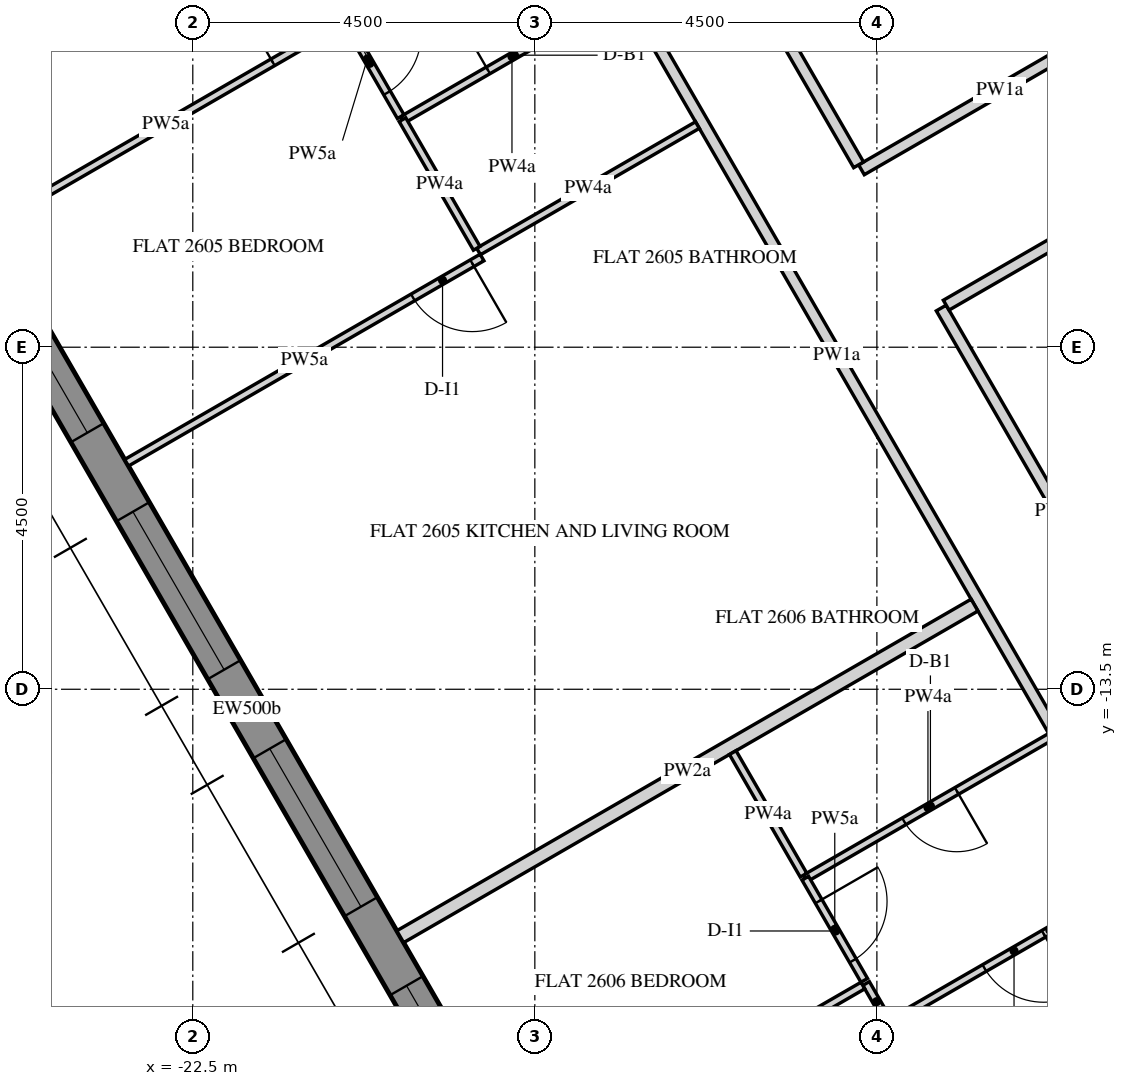
"""IFC4 building model, lengths in metres.
Left out: names, types, materials, properties, quantities, classifications, styles, units other than length and angle.
Written with IfcOpenShell. Run it as: python <this file> out.ifc"""

import sys

from ifc_helpers import new_model, si_unit, direction, frame, frame_2d, origin, place, context, subcontext, project, spatial, polyline, rectangle, outline, extrude, element, fill, save


model = new_model("IFC4")
c1 = context("Model", 3, precision=1e-05, world=origin(), true_north=direction((0.0, 1.0)))
c2 = subcontext(c1, "Body", "Model", "MODEL_VIEW")
j1 = project(units=[si_unit("LENGTHUNIT", "METRE"), si_unit("PLANEANGLEUNIT", "RADIAN")], contexts=[c1])
p1 = place(None, origin())
s1 = spatial("IfcSite", under=j1, at=p1, CompositionType="ELEMENT")
p2 = place(p1, origin())
s2 = spatial("IfcBuilding", under=s1, at=p2, CompositionType="ELEMENT")
p3 = place(p2, frame((0.0, 0.0, 334.2)))
s3 = spatial("IfcBuildingStorey", under=s2, at=p3, CompositionType="ELEMENT", Elevation=334.2)
p4 = place(p3, frame((-28.149, -2.745, -0.15), z_axis=(0.0, 0.0, 1.0), x_axis=(0.500003737743, -0.866023245787, 0.0)))
e1 = element("IfcWall", 1, at=p4, inside=s3, PredefinedType="SOLIDWALL", context=c2, shape_type="SweptSolid", body=[
    extrude(outline(polyline([(-0.021, -0.25), (25.468, -0.25), (25.421, 0.25), (0.021, 0.25), (-0.021, -0.25)])), origin(), (0.0, 0.0, 1.0), 3.75),
])
p5 = place(p4, frame((2.522, 0.0, 0.75)))
e2 = element("IfcOpeningElement", 2, at=p5, cuts=e1, PredefinedType="OPENING", context=c2, shape_type="SweptSolid", body=[
    extrude(rectangle(XDim=2.4, YDim=2.7, at=frame_2d((1.2, 1.35))), frame((0.0, 0.26, 0.0), z_axis=(0.0, -1.0, 0.0), x_axis=(1.0, 0.0, 0.0)), (0.0, 0.0, 1.0), 0.52),
])
p6 = place(p4, frame((6.122, 0.0, 0.75)))
e3 = element("IfcOpeningElement", 3, at=p6, cuts=e1, PredefinedType="OPENING", context=c2, shape_type="SweptSolid", body=[
    extrude(rectangle(XDim=2.4, YDim=2.7, at=frame_2d((1.2, 1.35))), frame((0.0, 0.26, 0.0), z_axis=(0.0, -1.0, 0.0), x_axis=(1.0, 0.0, 0.0)), (0.0, 0.0, 1.0), 0.52),
])
p7 = place(p4, frame((9.722, 0.0, 0.75)))
e4 = element("IfcOpeningElement", 4, at=p7, cuts=e1, PredefinedType="OPENING", context=c2, shape_type="SweptSolid", body=[
    extrude(rectangle(XDim=2.4, YDim=2.7, at=frame_2d((1.2, 1.35))), frame((0.0, 0.26, 0.0), z_axis=(0.0, -1.0, 0.0), x_axis=(1.0, 0.0, 0.0)), (0.0, 0.0, 1.0), 0.52),
])
p8 = place(p4, frame((13.323, 0.0, 0.75)))
e5 = element("IfcOpeningElement", 5, at=p8, cuts=e1, PredefinedType="OPENING", context=c2, shape_type="SweptSolid", body=[
    extrude(rectangle(XDim=2.4, YDim=2.7, at=frame_2d((1.2, 1.35))), frame((0.0, 0.26, 0.0), z_axis=(0.0, -1.0, 0.0), x_axis=(1.0, 0.0, 0.0)), (0.0, 0.0, 1.0), 0.52),
])
p9 = place(p4, frame((16.922, 0.0, 0.75)))
e6 = element("IfcOpeningElement", 6, at=p9, cuts=e1, PredefinedType="OPENING", context=c2, shape_type="SweptSolid", body=[
    extrude(rectangle(XDim=2.4, YDim=2.7, at=frame_2d((1.2, 1.35))), frame((0.0, 0.26, 0.0), z_axis=(0.0, -1.0, 0.0), x_axis=(1.0, 0.0, 0.0)), (0.0, 0.0, 1.0), 0.52),
])
p10 = place(p4, frame((20.522, 0.0, 0.75)))
e7 = element("IfcOpeningElement", 7, at=p10, cuts=e1, PredefinedType="OPENING", context=c2, shape_type="SweptSolid", body=[
    extrude(rectangle(XDim=2.4, YDim=2.7, at=frame_2d((1.2, 1.35))), frame((0.0, 0.26, 0.0), z_axis=(0.0, -1.0, 0.0), x_axis=(1.0, 0.0, 0.0)), (0.0, 0.0, 1.0), 0.52),
])
p11 = place(p3, frame((-12.471, 0.0, -0.15), z_axis=(0.0, 0.0, 1.0), x_axis=(0.499996419489, -0.866027470984, 0.0)))
e8 = element("IfcWall", 8, at=p11, inside=s3, PredefinedType="SHEAR", context=c2, shape_type="SweptSolid", body=[
    extrude(outline(polyline([(-0.115, -0.2), (12.586, -0.2), (12.355, 0.2), (0.115, 0.2), (-0.115, -0.2)])), origin(), (0.0, 0.0, 1.0), 3.75),
])
p12 = place(p11, frame((5.306, 0.0, 0.15)))
e9 = element("IfcOpeningElement", 9, at=p12, cuts=e8, PredefinedType="OPENING", context=c2, shape_type="SweptSolid", body=[
    extrude(rectangle(XDim=1.8, YDim=2.4, at=frame_2d((0.9, 1.2))), frame((0.0, 0.21, 0.0), z_axis=(0.0, -1.0, 0.0), x_axis=(1.0, 0.0, 0.0)), (0.0, 0.0, 1.0), 0.42),
])
p13 = place(p3, frame((-17.696, -2.749, 0.0), z_axis=(0.0, 0.0, 1.0), x_axis=(0.499997948852, -0.866026588012, 0.0)))
e10 = element("IfcWall", 10, at=p13, inside=s3, PredefinedType="PARTITIONING", context=c2, shape_type="SweptSolid", body=[
    extrude(rectangle(XDim=14.677, YDim=0.15, at=frame_2d((7.339, 0.0))), origin(), (0.0, 0.0, 1.0), 2.838),
])
p14 = place(p13, frame((0.4, 0.0, 0.0)))
e11 = element("IfcOpeningElement", 11, at=p14, cuts=e10, PredefinedType="OPENING", context=c2, shape_type="SweptSolid", body=[
    extrude(rectangle(XDim=1.0, YDim=2.1, at=frame_2d((0.5, 1.05))), frame((0.0, 0.085, 0.0), z_axis=(0.0, -1.0, 0.0), x_axis=(1.0, 0.0, 0.0)), (0.0, 0.0, 1.0), 0.17),
])
p15 = place(p13, frame((13.527, 0.0, 0.0)))
e12 = element("IfcOpeningElement", 12, at=p15, cuts=e10, PredefinedType="OPENING", context=c2, shape_type="SweptSolid", body=[
    extrude(rectangle(XDim=1.0, YDim=2.1, at=frame_2d((0.5, 1.05))), frame((0.0, 0.085, 0.0), z_axis=(0.0, -1.0, 0.0), x_axis=(1.0, 0.0, 0.0)), (0.0, 0.0, 1.0), 0.17),
])
p16 = place(p3, frame((-10.066, -4.566, 0.0), z_axis=(0.0, 0.0, 1.0), x_axis=(-0.866023935413, -0.500002543286, 0.0)))
e13 = element("IfcWall", 13, at=p16, inside=s3, PredefinedType="PARTITIONING", context=c2, shape_type="SweptSolid", body=[
    extrude(rectangle(XDim=4.2, YDim=0.15, at=frame_2d((2.1, 0.0))), origin(), (0.0, 0.0, 1.0), 2.838),
])
p17 = place(p3, frame((-13.74, -6.601, 0.0), z_axis=(0.0, 0.0, 1.0), x_axis=(-0.499976727135, 0.866038839962, 0.0)))
e14 = element("IfcWall", 14, at=p17, inside=s3, PredefinedType="PARTITIONING", context=c2, shape_type="SweptSolid", body=[
    extrude(rectangle(XDim=4.516, YDim=0.15, at=frame_2d((2.258, 0.0))), origin(), (0.0, 0.0, 1.0), 2.838),
])
p18 = place(p3, frame((-9.569, -13.826, 0.0), z_axis=(0.0, 0.0, 1.0), x_axis=(-0.500017101833, 0.866015529811, 0.0)))
e15 = element("IfcWall", 15, at=p18, inside=s3, PredefinedType="PARTITIONING", context=c2, shape_type="SweptSolid", body=[
    extrude(rectangle(XDim=6.168, YDim=0.15, at=frame_2d((3.084, 0.0))), origin(), (0.0, 0.0, 1.0), 2.838),
])
p19 = place(p3, frame((-12.588, -8.447, 0.0), z_axis=(0.0, 0.0, 1.0), x_axis=(0.866034795751, 0.499983732284, 0.0)))
e16 = element("IfcWall", 16, at=p19, inside=s3, PredefinedType="PARTITIONING", context=c2, shape_type="SweptSolid", body=[
    extrude(rectangle(XDim=4.125, YDim=0.15, at=frame_2d((2.062, 0.0))), origin(), (0.0, 0.0, 1.0), 2.838),
])
p20 = place(p3, frame((-15.861, -6.078, 0.0), z_axis=(0.0, 0.0, 1.0), x_axis=(-0.866020521143, -0.500008456887, 0.0)))
e17 = element("IfcWall", 17, at=p20, inside=s3, PredefinedType="PARTITIONING", context=c2, shape_type="SweptSolid", body=[
    extrude(rectangle(XDim=3.325, YDim=0.1, at=frame_2d((1.663, 0.0))), origin(), (0.0, 0.0, 1.0), 2.838),
])
p21 = place(p3, frame((-18.695, -7.82, 0.0), z_axis=(0.0, 0.0, 1.0), x_axis=(-0.866028230842, -0.499995103361, 0.0)))
e18 = element("IfcWall", 18, at=p21, inside=s3, PredefinedType="PARTITIONING", context=c2, shape_type="SweptSolid", body=[
    extrude(rectangle(XDim=5.4, YDim=0.1, at=frame_2d((2.7, 0.0))), origin(), (0.0, 0.0, 1.0), 2.838),
])
p22 = place(p21, frame((0.15, 0.0, 0.0)))
e19 = element("IfcOpeningElement", 19, at=p22, cuts=e18, PredefinedType="OPENING", context=c2, shape_type="SweptSolid", body=[
    extrude(rectangle(XDim=0.9, YDim=2.1, at=frame_2d((0.45, 1.05))), frame((0.0, 0.06, 0.0), z_axis=(0.0, -1.0, 0.0), x_axis=(1.0, 0.0, 0.0)), (0.0, 0.0, 1.0), 0.12),
])
p23 = place(p3, frame((-19.771, -16.755, 0.0), z_axis=(0.0, 0.0, 1.0), x_axis=(0.866025292695, 0.500000192413, 0.0)))
e20 = element("IfcWall", 20, at=p23, inside=s3, PredefinedType="PARTITIONING", context=c2, shape_type="SweptSolid", body=[
    extrude(rectangle(XDim=8.725, YDim=0.18, at=frame_2d((4.363, 0.0))), origin(), (0.0, 0.0, 1.0), 2.838),
])
p24 = place(p3, frame((-19.741, -6.008, 0.0), z_axis=(0.0, 0.0, 1.0), x_axis=(0.866052313871, 0.499953387465, 0.0)))
e21 = element("IfcWall", 21, at=p24, inside=s3, PredefinedType="PARTITIONING", context=c2, shape_type="SweptSolid", body=[
    extrude(rectangle(XDim=3.325, YDim=0.1, at=frame_2d((1.663, 0.0))), origin(), (0.0, 0.0, 1.0), 2.838),
])
p25 = place(p24, frame((1.3, 0.0, 0.0)))
e22 = element("IfcOpeningElement", 22, at=p25, cuts=e21, PredefinedType="OPENING", context=c2, shape_type="SweptSolid", body=[
    extrude(rectangle(XDim=0.8, YDim=2.1, at=frame_2d((0.4, 1.05))), frame((0.0, 0.06, 0.0), z_axis=(0.0, -1.0, 0.0), x_axis=(1.0, 0.0, 0.0)), (0.0, 0.0, 1.0), 0.12),
])
p26 = place(p3, frame((-20.642, -4.448, 0.0), z_axis=(0.0, 0.0, 1.0), x_axis=(0.499971461383, -0.866041879935, 0.0)))
e23 = element("IfcWall", 23, at=p26, inside=s3, PredefinedType="PARTITIONING", context=c2, shape_type="SweptSolid", body=[
    extrude(rectangle(XDim=1.754, YDim=0.1, at=frame_2d((0.877, 0.0))), origin(), (0.0, 0.0, 1.0), 2.838),
])
p27 = place(p26, frame((0.494, 0.0, 0.0)))
e24 = element("IfcOpeningElement", 24, at=p27, cuts=e23, PredefinedType="OPENING", context=c2, shape_type="SweptSolid", body=[
    extrude(rectangle(XDim=0.9, YDim=2.1, at=frame_2d((0.45, 1.05))), frame((0.0, 0.06, 0.0), z_axis=(0.0, -1.0, 0.0), x_axis=(1.0, 0.0, 0.0)), (0.0, 0.0, 1.0), 0.12),
])
p28 = place(p3, frame((-19.742, -6.006, 0.0), z_axis=(0.0, 0.0, 1.0), x_axis=(0.499982003349, -0.866035793907, 0.0)))
e25 = element("IfcWall", 25, at=p28, inside=s3, PredefinedType="PARTITIONING", context=c2, shape_type="SweptSolid", body=[
    extrude(rectangle(XDim=1.954, YDim=0.1, at=frame_2d((0.977, 0.0))), origin(), (0.0, 0.0, 1.0), 2.838),
])
p29 = place(p3, frame((-25.171, -7.402, 0.0), z_axis=(0.0, 0.0, 1.0), x_axis=(0.866013074135, 0.500021354972, 0.0)))
e26 = element("IfcWall", 26, at=p29, inside=s3, PredefinedType="PARTITIONING", context=c2, shape_type="SweptSolid", body=[
    extrude(rectangle(XDim=5.35, YDim=0.1, at=frame_2d((2.675, 0.0))), origin(), (0.0, 0.0, 1.0), 2.838),
])
p30 = place(p29, frame((4.3, 0.0, 0.0)))
e27 = element("IfcOpeningElement", 27, at=p30, cuts=e26, PredefinedType="OPENING", context=c2, shape_type="SweptSolid", body=[
    extrude(rectangle(XDim=0.9, YDim=2.1, at=frame_2d((0.45, 1.05))), frame((0.0, 0.06, 0.0), z_axis=(0.0, -1.0, 0.0), x_axis=(1.0, 0.0, 0.0)), (0.0, 0.0, 1.0), 0.12),
])
p31 = place(p3, frame((-9.107, -15.448, 0.0), z_axis=(0.0, 0.0, 1.0), x_axis=(-0.866025094983, -0.500000534859, 0.0)))
e28 = element("IfcWall", 28, at=p31, inside=s3, PredefinedType="PARTITIONING", context=c2, shape_type="SweptSolid", body=[
    extrude(rectangle(XDim=4.889, YDim=0.1, at=frame_2d((2.445, 0.0))), origin(), (0.0, 0.0, 1.0), 2.838),
])
p32 = place(p31, frame((2.539, 0.0, 0.0)))
e29 = element("IfcOpeningElement", 29, at=p32, cuts=e28, PredefinedType="OPENING", context=c2, shape_type="SweptSolid", body=[
    extrude(rectangle(XDim=0.9, YDim=2.1, at=frame_2d((0.45, 1.05))), frame((0.0, 0.06, 0.0), z_axis=(0.0, -1.0, 0.0), x_axis=(1.0, 0.0, 0.0)), (0.0, 0.0, 1.0), 0.12),
])
p33 = place(p3, frame((-13.366, -17.849, 0.0), z_axis=(0.0, 0.0, 1.0), x_axis=(-0.499850094852, 0.866111934265, 0.0)))
e30 = element("IfcWall", 30, at=p33, inside=s3, PredefinedType="PARTITIONING", context=c2, shape_type="SweptSolid", body=[
    extrude(rectangle(XDim=0.552, YDim=0.1, at=frame_2d((0.276, 0.0))), origin(), (0.0, 0.0, 1.0), 2.838),
])
p34 = place(p3, frame((-13.684, -17.398, 0.0), z_axis=(0.0, 0.0, 1.0), x_axis=(-0.866040211805, -0.499974350878, 0.0)))
e31 = element("IfcWall", 31, at=p34, inside=s3, PredefinedType="PARTITIONING", context=c2, shape_type="SweptSolid", body=[
    extrude(rectangle(XDim=4.95, YDim=0.1, at=frame_2d((2.475, 0.0))), origin(), (0.0, 0.0, 1.0), 2.838),
])
p35 = place(p3, frame((-11.215, -14.125, 0.0), z_axis=(0.0, 0.0, 1.0), x_axis=(-0.866028424924, -0.499994767197, 0.0)))
e32 = element("IfcWall", 32, at=p35, inside=s3, PredefinedType="PARTITIONING", context=c2, shape_type="SweptSolid", body=[
    extrude(rectangle(XDim=3.725, YDim=0.1, at=frame_2d((1.863, 0.0))), origin(), (0.0, 0.0, 1.0), 2.838),
])
p36 = place(p35, frame((1.425, 0.0, 0.0)))
e33 = element("IfcOpeningElement", 33, at=p36, cuts=e32, PredefinedType="OPENING", context=c2, shape_type="SweptSolid", body=[
    extrude(rectangle(XDim=0.8, YDim=2.1, at=frame_2d((0.4, 1.05))), frame((0.0, 0.06, 0.0), z_axis=(0.0, -1.0, 0.0), x_axis=(1.0, 0.0, 0.0)), (0.0, 0.0, 1.0), 0.12),
])
p37 = place(p3, frame((-14.442, -15.986, 0.0), z_axis=(0.0, 0.0, 1.0), x_axis=(0.50008102322, -0.865978619952, 0.0)))
e34 = element("IfcWall", 34, at=p37, inside=s3, PredefinedType="PARTITIONING", context=c2, shape_type="SweptSolid", body=[
    extrude(rectangle(XDim=1.552, YDim=0.1, at=frame_2d((0.776, 0.0))), origin(), (0.0, 0.0, 1.0), 2.838),
])
p38 = place(p37, frame((0.352, 0.0, 0.0)))
e35 = element("IfcOpeningElement", 35, at=p38, cuts=e34, PredefinedType="OPENING", context=c2, shape_type="SweptSolid", body=[
    extrude(rectangle(XDim=0.9, YDim=2.1, at=frame_2d((0.45, 1.05))), frame((0.0, 0.06, 0.0), z_axis=(0.0, -1.0, 0.0), x_axis=(1.0, 0.0, 0.0)), (0.0, 0.0, 1.0), 0.12),
])
p39 = place(p3, frame((-15.396, -14.333, 0.0), z_axis=(0.0, 0.0, 1.0), x_axis=(0.500115926523, -0.865958463229, 0.0)))
e36 = element("IfcWall", 36, at=p39, inside=s3, PredefinedType="PARTITIONING", context=c2, shape_type="SweptSolid", body=[
    extrude(rectangle(XDim=1.862, YDim=0.1, at=frame_2d((0.931, 0.0))), origin(), (0.0, 0.0, 1.0), 2.838),
])
p40 = place(p6, frame((0.0, 0.18, 0.0)))
e37 = element("IfcWindow", 37, at=p40, inside=s3, PartitioningType="DOUBLE_PANEL_VERTICAL", PredefinedType="WINDOW", context=c2, shape_type="SweptSolid", body=[
    extrude(rectangle(XDim=2.4, YDim=2.7, at=frame_2d((1.2, 1.35))), frame((0.0, 0.03, 0.0), z_axis=(0.0, -1.0, 0.0), x_axis=(1.0, 0.0, 0.0)), (0.0, 0.0, 1.0), 0.06),
])
fill(e3, e37)
p41 = place(p7, frame((0.0, 0.18, 0.0)))
e38 = element("IfcWindow", 38, at=p41, inside=s3, PartitioningType="DOUBLE_PANEL_VERTICAL", PredefinedType="WINDOW", context=c2, shape_type="SweptSolid", body=[
    extrude(rectangle(XDim=2.4, YDim=2.7, at=frame_2d((1.2, 1.35))), frame((0.0, 0.03, 0.0), z_axis=(0.0, -1.0, 0.0), x_axis=(1.0, 0.0, 0.0)), (0.0, 0.0, 1.0), 0.06),
])
fill(e4, e38)
p42 = place(p8, frame((0.0, 0.18, 0.0)))
e39 = element("IfcWindow", 39, at=p42, inside=s3, PartitioningType="DOUBLE_PANEL_VERTICAL", PredefinedType="WINDOW", context=c2, shape_type="SweptSolid", body=[
    extrude(rectangle(XDim=2.4, YDim=2.7, at=frame_2d((1.2, 1.35))), frame((0.0, 0.03, 0.0), z_axis=(0.0, -1.0, 0.0), x_axis=(1.0, 0.0, 0.0)), (0.0, 0.0, 1.0), 0.06),
])
fill(e5, e39)
p43 = place(p9, frame((0.0, 0.18, 0.0)))
e40 = element("IfcWindow", 40, at=p43, inside=s3, PartitioningType="DOUBLE_PANEL_VERTICAL", PredefinedType="WINDOW", context=c2, shape_type="SweptSolid", body=[
    extrude(rectangle(XDim=2.4, YDim=2.7, at=frame_2d((1.2, 1.35))), frame((0.0, 0.03, 0.0), z_axis=(0.0, -1.0, 0.0), x_axis=(1.0, 0.0, 0.0)), (0.0, 0.0, 1.0), 0.06),
])
fill(e6, e40)
p44 = place(p25, origin())
e41 = element("IfcDoor", 41, at=p44, inside=s3, OperationType="SINGLE_SWING_LEFT", PredefinedType="DOOR", context=c2, shape_type="SweptSolid", body=[
    extrude(rectangle(XDim=0.8, YDim=2.1, at=frame_2d((0.4, 1.05))), frame((0.0, 0.025, 0.0), z_axis=(0.0, -1.0, 0.0), x_axis=(1.0, 0.0, 0.0)), (0.0, 0.0, 1.0), 0.05),
])
fill(e22, e41)
p45 = place(p27, origin())
e42 = element("IfcDoor", 42, at=p45, inside=s3, OperationType="SINGLE_SWING_RIGHT", PredefinedType="DOOR", context=c2, shape_type="SweptSolid", body=[
    extrude(rectangle(XDim=0.9, YDim=2.1, at=frame_2d((0.45, 1.05))), frame((0.0, 0.025, 0.0), z_axis=(0.0, -1.0, 0.0), x_axis=(1.0, 0.0, 0.0)), (0.0, 0.0, 1.0), 0.05),
])
fill(e24, e42)
p46 = place(p30, origin())
e43 = element("IfcDoor", 43, at=p46, inside=s3, OperationType="SINGLE_SWING_RIGHT", PredefinedType="DOOR", context=c2, shape_type="SweptSolid", body=[
    extrude(rectangle(XDim=0.9, YDim=2.1, at=frame_2d((0.45, 1.05))), frame((0.0, 0.025, 0.0), z_axis=(0.0, -1.0, 0.0), x_axis=(1.0, 0.0, 0.0)), (0.0, 0.0, 1.0), 0.05),
])
fill(e27, e43)
p47 = place(p22, origin())
e44 = element("IfcDoor", 44, at=p47, inside=s3, OperationType="SINGLE_SWING_RIGHT", PredefinedType="DOOR", context=c2, shape_type="SweptSolid", body=[
    extrude(rectangle(XDim=0.9, YDim=2.1, at=frame_2d((0.45, 1.05))), frame((0.0, 0.025, 0.0), z_axis=(0.0, -1.0, 0.0), x_axis=(1.0, 0.0, 0.0)), (0.0, 0.0, 1.0), 0.05),
])
fill(e19, e44)
p48 = place(p36, origin())
e45 = element("IfcDoor", 45, at=p48, inside=s3, OperationType="SINGLE_SWING_RIGHT", PredefinedType="DOOR", context=c2, shape_type="SweptSolid", body=[
    extrude(rectangle(XDim=0.8, YDim=2.1, at=frame_2d((0.4, 1.05))), frame((0.0, 0.025, 0.0), z_axis=(0.0, -1.0, 0.0), x_axis=(1.0, 0.0, 0.0)), (0.0, 0.0, 1.0), 0.05),
])
fill(e33, e45)
p49 = place(p32, origin())
e46 = element("IfcDoor", 46, at=p49, inside=s3, OperationType="SINGLE_SWING_LEFT", PredefinedType="DOOR", context=c2, shape_type="SweptSolid", body=[
    extrude(rectangle(XDim=0.9, YDim=2.1, at=frame_2d((0.45, 1.05))), frame((0.0, 0.025, 0.0), z_axis=(0.0, -1.0, 0.0), x_axis=(1.0, 0.0, 0.0)), (0.0, 0.0, 1.0), 0.05),
])
fill(e29, e46)
p50 = place(p38, origin())
e47 = element("IfcDoor", 47, at=p50, inside=s3, OperationType="SINGLE_SWING_LEFT", PredefinedType="DOOR", context=c2, shape_type="SweptSolid", body=[
    extrude(rectangle(XDim=0.9, YDim=2.1, at=frame_2d((0.45, 1.05))), frame((0.0, 0.025, 0.0), z_axis=(0.0, -1.0, 0.0), x_axis=(1.0, 0.0, 0.0)), (0.0, 0.0, 1.0), 0.05),
])
fill(e35, e47)
save(model, sys.argv[1])
